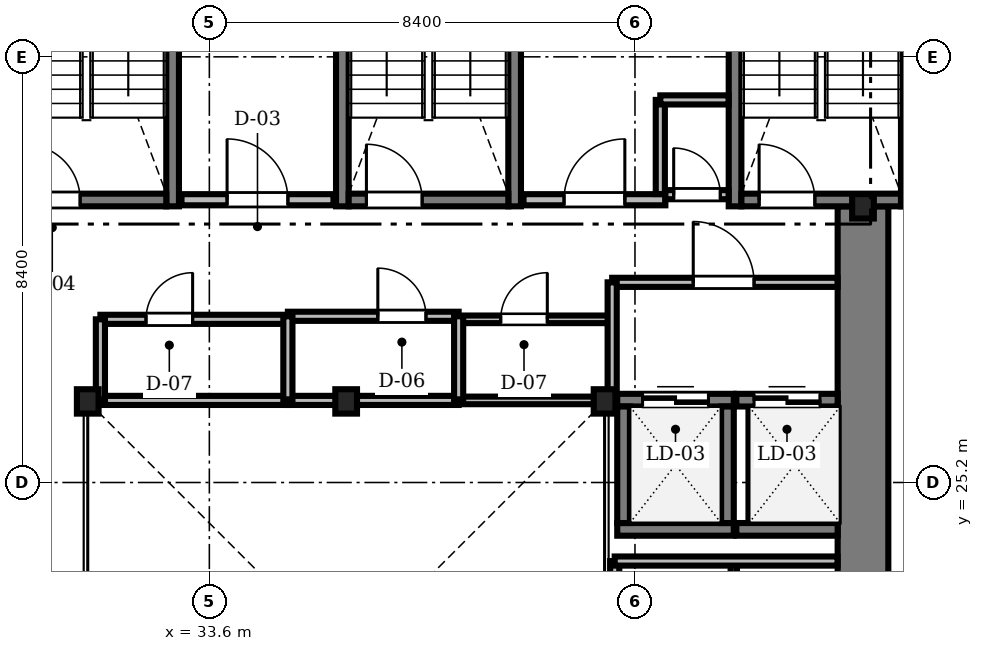
"""IFC4 building model, lengths in metres.
Left out: names, types, materials, properties, quantities, classifications, styles, units other than length and angle.
Written with IfcOpenShell. Run it as: python <this file> out.ifc"""

import sys

from ifc_helpers import new_model, si_unit, direction, frame, frame_2d, origin, origin_2d, place, context, subcontext, project, spatial, rectangle, i_section, extrude, source, transform, mapped, element, fill, save


model = new_model("IFC4")
c1 = context("Model", 3, precision=1e-05, world=origin(), true_north=direction((0.0, 1.0)))
c2 = subcontext(c1, "Body", "Model", "MODEL_VIEW")
j1 = project(units=[si_unit("LENGTHUNIT", "METRE"), si_unit("PLANEANGLEUNIT", "RADIAN")], contexts=[c1])
p1 = place(None, origin())
s1 = spatial("IfcSite", under=j1, at=p1, CompositionType="ELEMENT")
p2 = place(p1, origin())
s2 = spatial("IfcBuilding", under=s1, at=p2, CompositionType="ELEMENT")
p3 = place(p2, frame((0.0, 0.0, 56.8)))
s3 = spatial("IfcBuildingStorey", under=s2, at=p3, CompositionType="ELEMENT", Elevation=56.8)
m1 = source(origin(), c2, "Body", "SweptSolid", [
    extrude(rectangle(XDim=13.15, YDim=1.0, at=frame_2d((6.575, 0.0))), origin(), (0.0, 0.0, 1.0), 3.41),
])
p4 = place(p3, frame((46.5, 17.5, 0.0), z_axis=(0.0, 0.0, 1.0), x_axis=(0.0, 1.0, 0.0)))
e1 = element("IfcWall", 1, at=p4, inside=s3, PredefinedType="SHEAR", context=c2, shape_type="MappedRepresentation", body=[
    mapped(m1, transform((0.0, 0.0, 0.0), scale=1.0)),
])
m2 = source(origin(), c2, "Body", "SweptSolid", [
    extrude(i_section(OverallWidth=0.428, OverallDepth=0.481, WebThickness=0.04, FlangeThickness=0.063, FilletRadius=0.015, at=origin_2d()), origin(), (0.0, 0.0, 1.0), 3.41),
])
for number, where, z_axis, x_axis in (
    (2, (41.4, 26.8, 0.0), (0.0, 0.0, 1.0), (1.0, 0.0, 0.0)),
    (3, (36.3, 26.8, 0.0), (0.0, 0.0, 1.0), (1.0, 0.0, 0.0)),
    (4, (31.2, 26.8, 0.0), (0.0, 0.0, 1.0), (1.0, 0.0, 0.0)),
    (5, (46.5, 30.65, 0.0), (0.0, 0.0, 1.0), (1.0, 0.0, 0.0)),
):
    element("IfcColumn", number, at=place(p3, frame(where, z_axis=z_axis, x_axis=x_axis)), inside=s3, PredefinedType="COLUMN", context=c2, shape_type="MappedRepresentation", body=[
        mapped(m2, transform((0.0, 0.0, 0.0), scale=1.0)),
    ])
m3 = source(origin(), c2, "Body", "SweptSolid", [
    extrude(rectangle(XDim=9.15, YDim=0.25, at=frame_2d((4.575, 0.0))), origin(), (0.0, 0.0, 1.0), 3.45),
])
p5 = place(p3, frame((32.875, 30.65, 0.0), z_axis=(0.0, 0.0, 1.0), x_axis=(0.0, 1.0, 0.0)))
e6 = element("IfcWall", 6, at=p5, inside=s3, PredefinedType="SOLIDWALL", context=c2, shape_type="MappedRepresentation", body=[
    mapped(m3, transform((0.0, 0.0, 0.0), scale=1.0)),
])
m4 = source(origin(), c2, "Body", "SweptSolid", [
    extrude(rectangle(XDim=3.15, YDim=0.25, at=frame_2d((1.575, 0.0))), origin(), (0.0, 0.0, 1.0), 3.45),
])
p6 = place(p3, frame((29.6, 30.775, 0.0), z_axis=(0.0, 0.0, 1.0), x_axis=(1.0, 0.0, 0.0)))
e7 = element("IfcWall", 7, at=p6, inside=s3, PredefinedType="SOLIDWALL", context=c2, shape_type="MappedRepresentation", body=[
    mapped(m4, transform((0.0, 0.0, 0.0), scale=1.0)),
])
m5 = source(origin(), c2, "Body", "SweptSolid", [
    extrude(rectangle(XDim=1.1, YDim=2.2, at=frame_2d((0.55, 1.1))), frame((0.0, 0.135, 0.0), z_axis=(0.0, -1.0, 0.0), x_axis=(1.0, 0.0, 0.0)), (0.0, 0.0, 1.0), 0.27),
])
p7 = place(p6, frame((0.35, 0.0, 0.0)))
e8 = element("IfcOpeningElement", 8, at=p7, cuts=e7, PredefinedType="OPENING", context=c2, shape_type="MappedRepresentation", body=[
    mapped(m5, transform((0.0, 0.0, 0.0), scale=1.0)),
])
for number, where, z_axis, x_axis in (
    (9, (36.225, 30.65, 0.0), (0.0, 0.0, 1.0), (0.0, 1.0, 0.0)),
    (10, (39.625, 30.65, 0.0), (0.0, 0.0, 1.0), (0.0, 1.0, 0.0)),
):
    element("IfcWall", number, at=place(p3, frame(where, z_axis=z_axis, x_axis=x_axis)), inside=s3, PredefinedType="SOLIDWALL", context=c2, shape_type="MappedRepresentation", body=[
        mapped(m3, transform((0.0, 0.0, 0.0), scale=1.0)),
    ])
p8 = place(p3, frame((36.35, 30.775, 0.0), z_axis=(0.0, 0.0, 1.0), x_axis=(1.0, 0.0, 0.0)))
e11 = element("IfcWall", 11, at=p8, inside=s3, PredefinedType="SOLIDWALL", context=c2, shape_type="MappedRepresentation", body=[
    mapped(m4, transform((0.0, 0.0, 0.0), scale=1.0)),
])
p9 = place(p8, frame((0.35, 0.0, 0.0)))
e12 = element("IfcOpeningElement", 12, at=p9, cuts=e11, PredefinedType="OPENING", context=c2, shape_type="MappedRepresentation", body=[
    mapped(m5, transform((0.0, 0.0, 0.0), scale=1.0)),
])
for number, where, z_axis, x_axis in (
    (13, (43.975, 30.65, 0.0), (0.0, 0.0, 1.0), (0.0, 1.0, 0.0)),
    (14, (47.375, 30.65, 0.0), (0.0, 0.0, 1.0), (0.0, 1.0, 0.0)),
):
    element("IfcWall", number, at=place(p3, frame(where, z_axis=z_axis, x_axis=x_axis)), inside=s3, PredefinedType="SOLIDWALL", context=c2, shape_type="MappedRepresentation", body=[
        mapped(m3, transform((0.0, 0.0, 0.0), scale=1.0)),
    ])
p10 = place(p3, frame((44.1, 30.775, 0.0), z_axis=(0.0, 0.0, 1.0), x_axis=(1.0, 0.0, 0.0)))
e15 = element("IfcWall", 15, at=p10, inside=s3, PredefinedType="SOLIDWALL", context=c2, shape_type="MappedRepresentation", body=[
    mapped(m4, transform((0.0, 0.0, 0.0), scale=1.0)),
])
p11 = place(p10, frame((0.35, 0.0, 0.0)))
e16 = element("IfcOpeningElement", 16, at=p11, cuts=e15, PredefinedType="OPENING", context=c2, shape_type="MappedRepresentation", body=[
    mapped(m5, transform((0.0, 0.0, 0.0), scale=1.0)),
])
m6 = source(origin(), c2, "Body", "SweptSolid", [
    extrude(rectangle(XDim=3.0, YDim=0.22, at=frame_2d((1.5, 0.0))), origin(), (0.0, 0.0, 1.0), 3.41),
])
p12 = place(p3, frame((33.05, 30.78, 0.0), z_axis=(0.0, 0.0, 1.0), x_axis=(1.0, 0.0, 0.0)))
e17 = element("IfcWall", 17, at=p12, inside=s3, PredefinedType="SOLIDWALL", context=c2, shape_type="MappedRepresentation", body=[
    mapped(m6, transform((0.0, 0.0, 0.0), scale=1.0)),
])
m7 = source(origin(), c2, "Body", "SweptSolid", [
    extrude(rectangle(XDim=1.2, YDim=2.2, at=frame_2d((0.6, 1.1))), frame((0.0, 0.12, 0.0), z_axis=(0.0, -1.0, 0.0), x_axis=(1.0, 0.0, 0.0)), (0.0, 0.0, 1.0), 0.24),
])
p13 = place(p12, frame((0.9, 0.0, 0.0)))
e18 = element("IfcOpeningElement", 18, at=p13, cuts=e17, PredefinedType="OPENING", context=c2, shape_type="MappedRepresentation", body=[
    mapped(m7, transform((0.0, 0.0, 0.0), scale=1.0)),
])
m8 = source(origin(), c2, "Body", "SweptSolid", [
    extrude(rectangle(XDim=2.8, YDim=0.22, at=frame_2d((1.4, 0.0))), origin(), (0.0, 0.0, 1.0), 3.41),
])
p14 = place(p3, frame((39.8, 30.78, 0.0), z_axis=(0.0, 0.0, 1.0), x_axis=(1.0, 0.0, 0.0)))
e19 = element("IfcWall", 19, at=p14, inside=s3, PredefinedType="SOLIDWALL", context=c2, shape_type="MappedRepresentation", body=[
    mapped(m8, transform((0.0, 0.0, 0.0), scale=1.0)),
])
p15 = place(p14, frame((0.8, 0.0, 0.0)))
e20 = element("IfcOpeningElement", 20, at=p15, cuts=e19, PredefinedType="OPENING", context=c2, shape_type="MappedRepresentation", body=[
    mapped(m7, transform((0.0, 0.0, 0.0), scale=1.0)),
])
m9 = source(origin(), c2, "Body", "SweptSolid", [
    extrude(rectangle(XDim=2.3, YDim=0.25, at=frame_2d((1.15, 0.0))), origin(), (0.0, 0.0, 1.0), 3.41),
])
p16 = place(p3, frame((41.65, 24.275, 0.0), z_axis=(0.0, 0.0, 1.0), x_axis=(1.0, 0.0, 0.0)))
e21 = element("IfcWall", 21, at=p16, inside=s3, PredefinedType="SOLIDWALL", context=c2, shape_type="MappedRepresentation", body=[
    mapped(m9, transform((0.0, 0.0, 0.0), scale=1.0)),
])
p17 = place(p3, frame((41.65, 26.825, 0.0), z_axis=(0.0, 0.0, 1.0), x_axis=(1.0, 0.0, 0.0)))
e22 = element("IfcWall", 22, at=p17, inside=s3, PredefinedType="SOLIDWALL", context=c2, shape_type="MappedRepresentation", body=[
    mapped(m9, transform((0.0, 0.0, 0.0), scale=1.0)),
])
m10 = source(origin(), c2, "Body", "SweptSolid", [
    extrude(rectangle(XDim=1.3, YDim=2.3, at=frame_2d((0.65, 1.15))), frame((0.0, 0.135, 0.0), z_axis=(0.0, -1.0, 0.0), x_axis=(1.0, 0.0, 0.0)), (0.0, 0.0, 1.0), 0.27),
])
p18 = place(p17, frame((0.5, 0.0, 0.0)))
e23 = element("IfcOpeningElement", 23, at=p18, cuts=e22, PredefinedType="OPENING", context=c2, shape_type="MappedRepresentation", body=[
    mapped(m10, transform((0.0, 0.0, 0.0), scale=1.0)),
])
for number, where, z_axis, x_axis in (
    (24, (41.775, 24.4, 0.0), (0.0, 0.0, 1.0), (0.0, 1.0, 0.0)),
    (25, (43.825, 24.4, 0.0), (0.0, 0.0, 1.0), (0.0, 1.0, 0.0)),
):
    element("IfcWall", number, at=place(p3, frame(where, z_axis=z_axis, x_axis=x_axis)), inside=s3, PredefinedType="SOLIDWALL", context=c2, shape_type="MappedRepresentation", body=[
        mapped(m9, transform((0.0, 0.0, 0.0), scale=1.0)),
    ])
m11 = source(origin(), c2, "Body", "SweptSolid", [
    extrude(rectangle(XDim=2.0, YDim=0.25, at=frame_2d((1.0, 0.0))), origin(), (0.0, 0.0, 1.0), 3.41),
])
p19 = place(p3, frame((44.0, 24.275, 0.0), z_axis=(0.0, 0.0, 1.0), x_axis=(1.0, 0.0, 0.0)))
e26 = element("IfcWall", 26, at=p19, inside=s3, PredefinedType="SOLIDWALL", context=c2, shape_type="MappedRepresentation", body=[
    mapped(m11, transform((0.0, 0.0, 0.0), scale=1.0)),
])
p20 = place(p3, frame((44.0, 26.825, 0.0), z_axis=(0.0, 0.0, 1.0), x_axis=(1.0, 0.0, 0.0)))
e27 = element("IfcWall", 27, at=p20, inside=s3, PredefinedType="SOLIDWALL", context=c2, shape_type="MappedRepresentation", body=[
    mapped(m11, transform((0.0, 0.0, 0.0), scale=1.0)),
])
p21 = place(p20, frame((0.35, 0.0, 0.0)))
e28 = element("IfcOpeningElement", 28, at=p21, cuts=e27, PredefinedType="OPENING", context=c2, shape_type="MappedRepresentation", body=[
    mapped(m10, transform((0.0, 0.0, 0.0), scale=1.0)),
])
m12 = source(origin(), c2, "Body", "SweptSolid", [
    extrude(rectangle(XDim=4.448, YDim=0.18, at=frame_2d((2.224, 0.0))), origin(), (0.0, 0.0, 1.0), 3.042),
])
p22 = place(p3, frame((41.55, 29.15, 0.0), z_axis=(0.0, 0.0, 1.0), x_axis=(1.0, 0.0, 0.0)))
e29 = element("IfcWall", 29, at=p22, inside=s3, PredefinedType="PARTITIONING", context=c2, shape_type="MappedRepresentation", body=[
    mapped(m12, transform((0.0, 0.0, 0.0), scale=1.0)),
])
m13 = source(origin(), c2, "Body", "SweptSolid", [
    extrude(rectangle(XDim=1.2, YDim=2.2, at=frame_2d((0.6, 1.1))), frame((0.0, 0.1, 0.0), z_axis=(0.0, -1.0, 0.0), x_axis=(1.0, 0.0, 0.0)), (0.0, 0.0, 1.0), 0.2),
])
p23 = place(p22, frame((1.6, 0.0, 0.0)))
e30 = element("IfcOpeningElement", 30, at=p23, cuts=e29, PredefinedType="OPENING", context=c2, shape_type="MappedRepresentation", body=[
    mapped(m13, transform((0.0, 0.0, 0.0), scale=1.0)),
])
m14 = source(origin(), c2, "Body", "SweptSolid", [
    extrude(rectangle(XDim=3.7, YDim=0.18, at=frame_2d((1.85, 0.0))), origin(), (0.0, 0.0, 1.0), 3.042),
])
p24 = place(p3, frame((31.45, 28.42, 0.0), z_axis=(0.0, 0.0, 1.0), x_axis=(1.0, 0.0, 0.0)))
e31 = element("IfcWall", 31, at=p24, inside=s3, PredefinedType="PARTITIONING", context=c2, shape_type="MappedRepresentation", body=[
    mapped(m14, transform((0.0, 0.0, 0.0), scale=1.0)),
])
m15 = source(origin(), c2, "Body", "SweptSolid", [
    extrude(rectangle(XDim=0.92, YDim=2.1, at=frame_2d((0.46, 1.05))), frame((0.0, 0.1, 0.0), z_axis=(0.0, -1.0, 0.0), x_axis=(1.0, 0.0, 0.0)), (0.0, 0.0, 1.0), 0.2),
])
p25 = place(p24, frame((0.9, 0.0, 0.0)))
e32 = element("IfcOpeningElement", 32, at=p25, cuts=e31, PredefinedType="OPENING", context=c2, shape_type="MappedRepresentation", body=[
    mapped(m15, transform((0.0, 0.0, 0.0), scale=1.0)),
])
m16 = source(origin(), c2, "Body", "SweptSolid", [
    extrude(rectangle(XDim=3.37, YDim=0.18, at=frame_2d((1.685, 0.0))), origin(), (0.0, 0.0, 1.0), 3.41),
])
p26 = place(p3, frame((35.15, 28.48, 0.0), z_axis=(0.0, 0.0, 1.0), x_axis=(1.0, 0.0, 0.0)))
e33 = element("IfcWall", 33, at=p26, inside=s3, PredefinedType="PARTITIONING", context=c2, shape_type="MappedRepresentation", body=[
    mapped(m16, transform((0.0, 0.0, 0.0), scale=1.0)),
])
m17 = source(origin(), c2, "Body", "SweptSolid", [
    extrude(rectangle(XDim=0.95, YDim=2.15, at=frame_2d((0.475, 1.075))), frame((0.0, 0.1, 0.0), z_axis=(0.0, -1.0, 0.0), x_axis=(1.0, 0.0, 0.0)), (0.0, 0.0, 1.0), 0.2),
])
p27 = place(p26, frame((1.775, 0.0, 0.0)))
e34 = element("IfcOpeningElement", 34, at=p27, cuts=e33, PredefinedType="OPENING", context=c2, shape_type="MappedRepresentation", body=[
    mapped(m17, transform((0.0, 0.0, 0.0), scale=1.0)),
])
m18 = source(origin(), c2, "Body", "SweptSolid", [
    extrude(rectangle(XDim=3.0, YDim=0.15, at=frame_2d((1.5, 0.0))), origin(), (0.0, 0.0, 1.0), 3.41),
])
p28 = place(p3, frame((38.52, 28.42, 0.0), z_axis=(0.0, 0.0, 1.0), x_axis=(1.0, 0.0, 0.0)))
e35 = element("IfcWall", 35, at=p28, inside=s3, PredefinedType="PARTITIONING", context=c2, shape_type="MappedRepresentation", body=[
    mapped(m18, transform((0.0, 0.0, 0.0), scale=1.0)),
])
m19 = source(origin(), c2, "Body", "SweptSolid", [
    extrude(rectangle(XDim=0.92, YDim=2.1, at=frame_2d((0.46, 1.05))), frame((0.0, 0.085, 0.0), z_axis=(0.0, -1.0, 0.0), x_axis=(1.0, 0.0, 0.0)), (0.0, 0.0, 1.0), 0.17),
])
p29 = place(p28, frame((0.83, 0.0, 0.0)))
e36 = element("IfcOpeningElement", 36, at=p29, cuts=e35, PredefinedType="OPENING", context=c2, shape_type="MappedRepresentation", body=[
    mapped(m19, transform((0.0, 0.0, 0.0), scale=1.0)),
])
m20 = source(origin(), c2, "Body", "SweptSolid", [
    extrude(rectangle(XDim=1.248, YDim=0.18, at=frame_2d((0.624, 0.0))), origin(), (0.0, 0.0, 1.0), 3.41),
])
p30 = place(p3, frame((42.6, 30.88, 0.0), z_axis=(0.0, 0.0, 1.0), x_axis=(1.0, 0.0, 0.0)))
e37 = element("IfcWall", 37, at=p30, inside=s3, PredefinedType="PARTITIONING", context=c2, shape_type="MappedRepresentation", body=[
    mapped(m20, transform((0.0, 0.0, 0.0), scale=1.0)),
])
p31 = place(p30, frame((0.164, 0.0, 0.0)))
e38 = element("IfcOpeningElement", 38, at=p31, cuts=e37, PredefinedType="OPENING", context=c2, shape_type="MappedRepresentation", body=[
    mapped(m15, transform((0.0, 0.0, 0.0), scale=1.0)),
])
m21 = source(origin(), c2, "Body", "SweptSolid", [
    extrude(rectangle(XDim=7.15, YDim=0.18, at=frame_2d((3.575, 0.0))), origin(), (0.0, 0.0, 1.0), 2.802),
])
p32 = place(p3, frame((41.6, 16.5, 0.0), z_axis=(0.0, 0.0, 1.0), x_axis=(0.0, 1.0, 0.0)))
e39 = element("IfcWall", 39, at=p32, inside=s3, PredefinedType="PARTITIONING", context=c2, shape_type="MappedRepresentation", body=[
    mapped(m21, transform((0.0, 0.0, 0.0), scale=1.0)),
])
m22 = source(origin(), c2, "Body", "SweptSolid", [
    extrude(rectangle(XDim=7.15, YDim=0.125, at=frame_2d((3.575, 0.0))), origin(), (0.0, 0.0, 1.0), 2.802),
])
p33 = place(p3, frame((43.95, 16.5, 0.0), z_axis=(0.0, 0.0, 1.0), x_axis=(0.0, 1.0, 0.0)))
e40 = element("IfcWall", 40, at=p33, inside=s3, PredefinedType="PARTITIONING", context=c2, shape_type="MappedRepresentation", body=[
    mapped(m22, transform((0.0, 0.0, 0.0), scale=1.0)),
])
m23 = source(origin(), c2, "Body", "SweptSolid", [
    extrude(rectangle(XDim=4.398, YDim=0.18, at=frame_2d((2.199, 0.0))), origin(), (0.0, 0.0, 1.0), 3.41),
])
p34 = place(p3, frame((41.6, 23.65, 0.0), z_axis=(0.0, 0.0, 1.0), x_axis=(1.0, 0.0, 0.0)))
e41 = element("IfcWall", 41, at=p34, inside=s3, PredefinedType="PARTITIONING", context=c2, shape_type="MappedRepresentation", body=[
    mapped(m23, transform((0.0, 0.0, 0.0), scale=1.0)),
])
m24 = source(origin(), c2, "Body", "SweptSolid", [
    extrude(rectangle(XDim=3.7, YDim=0.18, at=frame_2d((1.85, 0.0))), origin(), (0.0, 0.0, 1.0), 2.952),
])
p35 = place(p3, frame((31.45, 26.82, 0.0), z_axis=(0.0, 0.0, 1.0), x_axis=(1.0, 0.0, 0.0)))
e42 = element("IfcWall", 42, at=p35, inside=s3, PredefinedType="PARTITIONING", context=c2, shape_type="MappedRepresentation", body=[
    mapped(m24, transform((0.0, 0.0, 0.0), scale=1.0)),
])
m25 = source(origin(), c2, "Body", "SweptSolid", [
    extrude(rectangle(XDim=3.37, YDim=0.18, at=frame_2d((1.685, 0.0))), origin(), (0.0, 0.0, 1.0), 2.952),
])
p36 = place(p3, frame((35.15, 26.82, 0.0), z_axis=(0.0, 0.0, 1.0), x_axis=(1.0, 0.0, 0.0)))
e43 = element("IfcWall", 43, at=p36, inside=s3, PredefinedType="PARTITIONING", context=c2, shape_type="MappedRepresentation", body=[
    mapped(m25, transform((0.0, 0.0, 0.0), scale=1.0)),
])
m26 = source(origin(), c2, "Body", "SweptSolid", [
    extrude(rectangle(XDim=3.0, YDim=0.15, at=frame_2d((1.5, 0.0))), origin(), (0.0, 0.0, 1.0), 2.802),
])
p37 = place(p3, frame((38.52, 26.82, 0.0), z_axis=(0.0, 0.0, 1.0), x_axis=(1.0, 0.0, 0.0)))
e44 = element("IfcWall", 44, at=p37, inside=s3, PredefinedType="PARTITIONING", context=c2, shape_type="MappedRepresentation", body=[
    mapped(m26, transform((0.0, 0.0, 0.0), scale=1.0)),
])
m27 = source(origin(), c2, "Body", "SweptSolid", [
    extrude(rectangle(XDim=2.35, YDim=0.18, at=frame_2d((1.175, 0.0))), origin(), (0.0, 0.0, 1.0), 2.802),
])
p38 = place(p3, frame((41.55, 26.8, 0.0), z_axis=(0.0, 0.0, 1.0), x_axis=(0.0, 1.0, 0.0)))
e45 = element("IfcWall", 45, at=p38, inside=s3, PredefinedType="PARTITIONING", context=c2, shape_type="MappedRepresentation", body=[
    mapped(m27, transform((0.0, 0.0, 0.0), scale=1.0)),
])
m28 = source(origin(), c2, "Body", "SweptSolid", [
    extrude(rectangle(XDim=1.858, YDim=0.18, at=frame_2d((0.929, 0.0))), origin(), (0.0, 0.0, 1.0), 3.41),
])
p39 = place(p3, frame((42.5, 30.892, 0.0), z_axis=(0.0, 0.0, 1.0), x_axis=(0.0, 1.0, 0.0)))
e46 = element("IfcWall", 46, at=p39, inside=s3, PredefinedType="PARTITIONING", context=c2, shape_type="MappedRepresentation", body=[
    mapped(m28, transform((0.0, 0.0, 0.0), scale=1.0)),
])
m29 = source(origin(), c2, "Body", "SweptSolid", [
    extrude(rectangle(XDim=1.66, YDim=0.18, at=frame_2d((0.83, 0.0))), origin(), (0.0, 0.0, 1.0), 2.952),
])
for number, where, z_axis, x_axis in (
    (47, (35.15, 26.82, 0.0), (0.0, 0.0, 1.0), (0.0, 1.0, 0.0)),
    (48, (38.52, 26.82, 0.0), (0.0, 0.0, 1.0), (0.0, 1.0, 0.0)),
):
    element("IfcWall", number, at=place(p3, frame(where, z_axis=z_axis, x_axis=x_axis)), inside=s3, PredefinedType="PARTITIONING", context=c2, shape_type="MappedRepresentation", body=[
        mapped(m29, transform((0.0, 0.0, 0.0), scale=1.0)),
    ])
m30 = source(origin(), c2, "Body", "SweptSolid", [
    extrude(rectangle(XDim=1.6, YDim=0.18, at=frame_2d((0.8, 0.0))), origin(), (0.0, 0.0, 1.0), 2.952),
])
p40 = place(p3, frame((31.45, 26.82, 0.0), z_axis=(0.0, 0.0, 1.0), x_axis=(0.0, 1.0, 0.0)))
e49 = element("IfcWall", 49, at=p40, inside=s3, PredefinedType="PARTITIONING", context=c2, shape_type="MappedRepresentation", body=[
    mapped(m30, transform((0.0, 0.0, 0.0), scale=1.0)),
])
m31 = source(origin(), c2, "Body", "SweptSolid", [
    extrude(rectangle(XDim=1.348, YDim=0.18, at=frame_2d((0.674, 0.0))), origin(), (0.0, 0.0, 1.0), 3.41),
])
p41 = place(p3, frame((42.5, 32.75, 0.0), z_axis=(0.0, 0.0, 1.0), x_axis=(1.0, 0.0, 0.0)))
e50 = element("IfcWall", 50, at=p41, inside=s3, PredefinedType="PARTITIONING", context=c2, shape_type="MappedRepresentation", body=[
    mapped(m31, transform((0.0, 0.0, 0.0), scale=1.0)),
])
m32 = source(origin(), c2, "Body", "SweptSolid", [
    extrude(rectangle(XDim=1.1, YDim=2.2, at=frame_2d((0.55, 1.1))), frame((0.0, 0.025, 0.0), z_axis=(0.0, -1.0, 0.0), x_axis=(1.0, 0.0, 0.0)), (0.0, 0.0, 1.0), 0.05),
])
p42 = place(p7, origin())
e51 = element("IfcDoor", 51, at=p42, inside=s3, OperationType="SINGLE_SWING_LEFT", PredefinedType="DOOR", context=c2, shape_type="MappedRepresentation", body=[
    mapped(m32, transform((0.0, 0.0, 0.0), scale=1.0)),
])
fill(e8, e51)
p43 = place(p9, origin())
e52 = element("IfcDoor", 52, at=p43, inside=s3, OperationType="SINGLE_SWING_LEFT", PredefinedType="DOOR", context=c2, shape_type="MappedRepresentation", body=[
    mapped(m32, transform((0.0, 0.0, 0.0), scale=1.0)),
])
fill(e12, e52)
p44 = place(p11, origin())
e53 = element("IfcDoor", 53, at=p44, inside=s3, OperationType="SINGLE_SWING_LEFT", PredefinedType="DOOR", context=c2, shape_type="MappedRepresentation", body=[
    mapped(m32, transform((0.0, 0.0, 0.0), scale=1.0)),
])
fill(e16, e53)
m33 = source(origin(), c2, "Body", "SweptSolid", [
    extrude(rectangle(XDim=1.2, YDim=2.2, at=frame_2d((0.6, 1.1))), frame((0.0, 0.025, 0.0), z_axis=(0.0, -1.0, 0.0), x_axis=(1.0, 0.0, 0.0)), (0.0, 0.0, 1.0), 0.05),
])
p45 = place(p13, origin())
e54 = element("IfcDoor", 54, at=p45, inside=s3, OperationType="SINGLE_SWING_LEFT", PredefinedType="DOOR", context=c2, shape_type="MappedRepresentation", body=[
    mapped(m33, transform((0.0, 0.0, 0.0), scale=1.0)),
])
fill(e18, e54)
p46 = place(p15, origin())
e55 = element("IfcDoor", 55, at=p46, inside=s3, OperationType="SINGLE_SWING_RIGHT", PredefinedType="DOOR", context=c2, shape_type="MappedRepresentation", body=[
    mapped(m33, transform((0.0, 0.0, 0.0), scale=1.0)),
])
fill(e20, e55)
m34 = source(origin(), c2, "Body", "SweptSolid", [
    extrude(rectangle(XDim=1.3, YDim=2.3, at=frame_2d((0.65, 1.15))), frame((0.0, 0.025, 0.0), z_axis=(0.0, -1.0, 0.0), x_axis=(1.0, 0.0, 0.0)), (0.0, 0.0, 1.0), 0.05),
])
p47 = place(p18, origin())
e56 = element("IfcDoor", 56, at=p47, inside=s3, OperationType="DOUBLE_DOOR_SLIDING", PredefinedType="DOOR", context=c2, shape_type="MappedRepresentation", body=[
    mapped(m34, transform((0.0, 0.0, 0.0), scale=1.0)),
])
fill(e23, e56)
p48 = place(p21, origin())
e57 = element("IfcDoor", 57, at=p48, inside=s3, OperationType="DOUBLE_DOOR_SLIDING", PredefinedType="DOOR", context=c2, shape_type="MappedRepresentation", body=[
    mapped(m34, transform((0.0, 0.0, 0.0), scale=1.0)),
])
fill(e28, e57)
p49 = place(p23, origin())
e58 = element("IfcDoor", 58, at=p49, inside=s3, OperationType="SINGLE_SWING_LEFT", PredefinedType="DOOR", context=c2, shape_type="MappedRepresentation", body=[
    mapped(m33, transform((0.0, 0.0, 0.0), scale=1.0)),
])
fill(e30, e58)
m35 = source(origin(), c2, "Body", "SweptSolid", [
    extrude(rectangle(XDim=0.92, YDim=2.1, at=frame_2d((0.46, 1.05))), frame((0.0, 0.025, 0.0), z_axis=(0.0, -1.0, 0.0), x_axis=(1.0, 0.0, 0.0)), (0.0, 0.0, 1.0), 0.05),
])
p50 = place(p25, origin())
e59 = element("IfcDoor", 59, at=p50, inside=s3, OperationType="SINGLE_SWING_RIGHT", PredefinedType="DOOR", context=c2, shape_type="MappedRepresentation", body=[
    mapped(m35, transform((0.0, 0.0, 0.0), scale=1.0)),
])
fill(e32, e59)
m36 = source(origin(), c2, "Body", "SweptSolid", [
    extrude(rectangle(XDim=0.95, YDim=2.15, at=frame_2d((0.475, 1.075))), frame((0.0, 0.025, 0.0), z_axis=(0.0, -1.0, 0.0), x_axis=(1.0, 0.0, 0.0)), (0.0, 0.0, 1.0), 0.05),
])
p51 = place(p27, origin())
e60 = element("IfcDoor", 60, at=p51, inside=s3, OperationType="SINGLE_SWING_LEFT", PredefinedType="DOOR", context=c2, shape_type="MappedRepresentation", body=[
    mapped(m36, transform((0.0, 0.0, 0.0), scale=1.0)),
])
fill(e34, e60)
p52 = place(p29, origin())
e61 = element("IfcDoor", 61, at=p52, inside=s3, OperationType="SINGLE_SWING_RIGHT", PredefinedType="DOOR", context=c2, shape_type="MappedRepresentation", body=[
    mapped(m35, transform((0.0, 0.0, 0.0), scale=1.0)),
])
fill(e36, e61)
p53 = place(p31, origin())
e62 = element("IfcDoor", 62, at=p53, inside=s3, OperationType="SINGLE_SWING_LEFT", PredefinedType="DOOR", context=c2, shape_type="MappedRepresentation", body=[
    mapped(m35, transform((0.0, 0.0, 0.0), scale=1.0)),
])
fill(e38, e62)
save(model, sys.argv[1])
